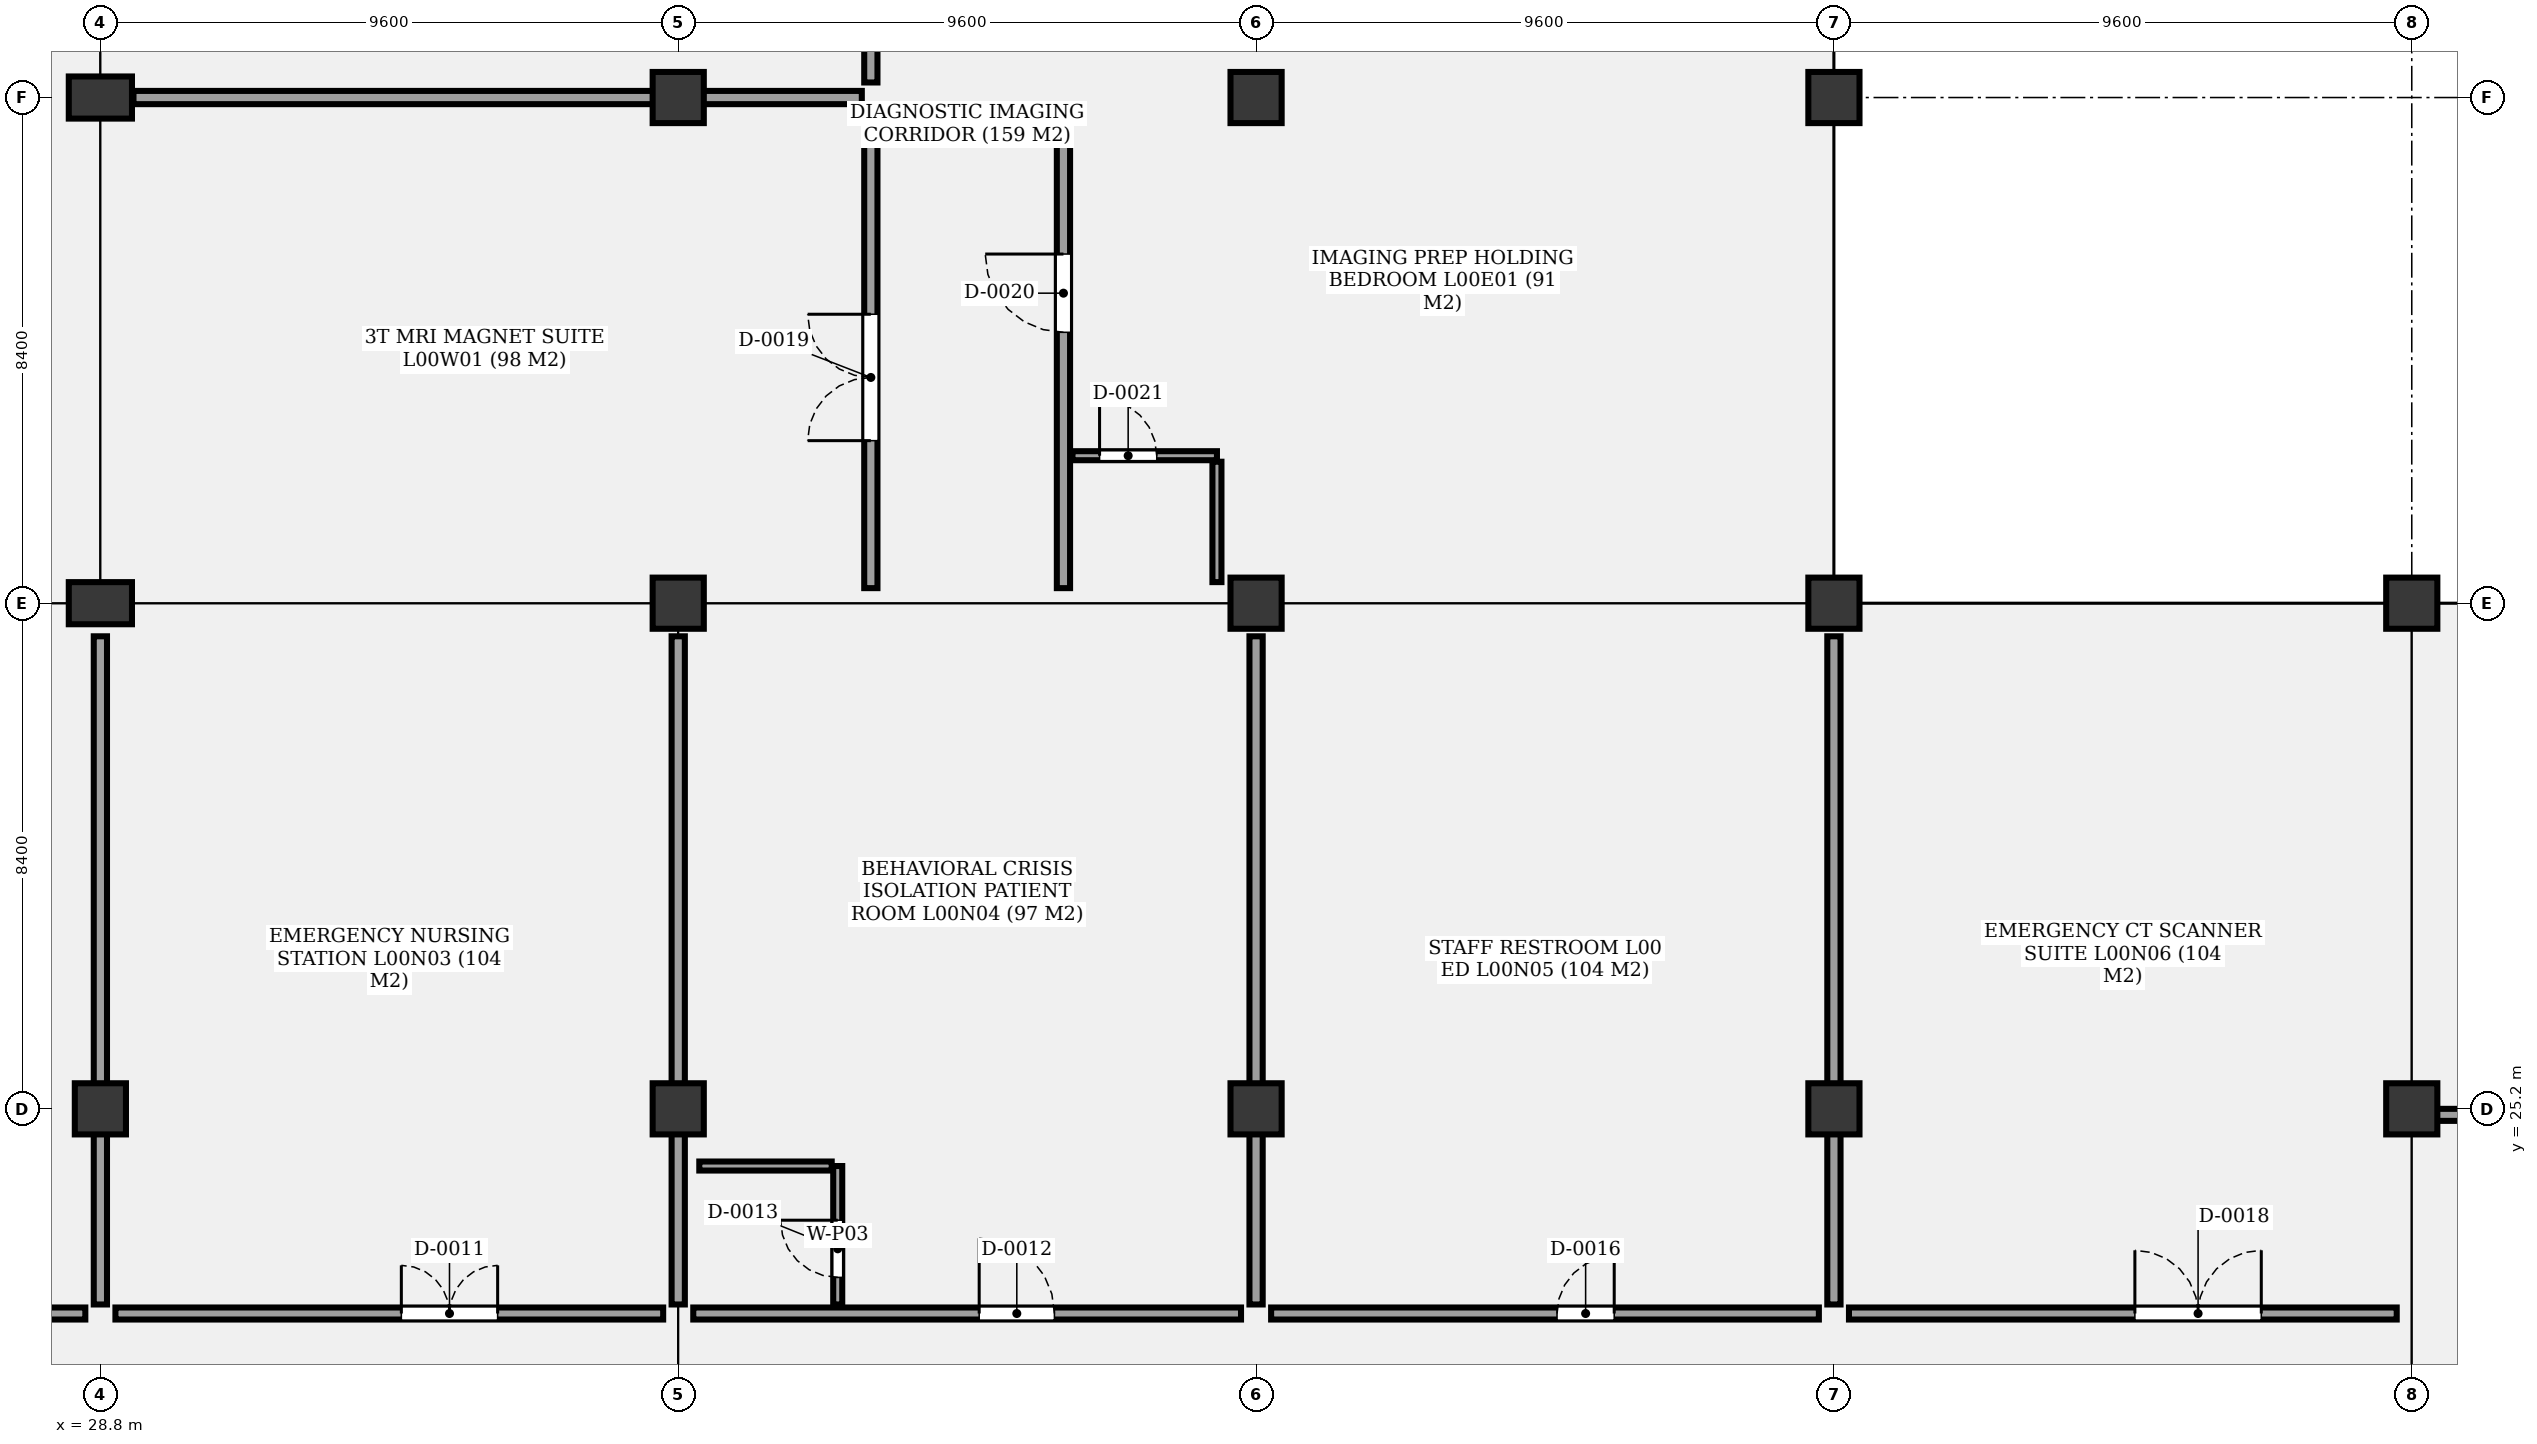
"""IFC4 building model, lengths in metres.
Left out: names, types, materials, properties, quantities, classifications, styles, units other than length and angle.
Written with IfcOpenShell. Run it as: python <this file> out.ifc"""

import sys

from ifc_helpers import new_model, si_unit, direction, frame, frame_2d, origin, origin_2d, place, context, subcontext, project, spatial, rectangle, extrude, element, fill, save


model = new_model("IFC4")
c1 = context("Model", 3, precision=1e-05, world=origin(), true_north=direction((0.0, 1.0)))
c2 = subcontext(c1, "Body", "Model", "MODEL_VIEW")
j1 = project(units=[si_unit("LENGTHUNIT", "METRE"), si_unit("PLANEANGLEUNIT", "RADIAN")], contexts=[c1])
p1 = place(None, origin())
s1 = spatial("IfcSite", under=j1, at=p1, CompositionType="ELEMENT")
p2 = place(p1, origin())
s2 = spatial("IfcBuilding", under=s1, at=p2, CompositionType="ELEMENT")
p3 = place(p2, origin())
s3 = spatial("IfcBuildingStorey", under=s2, at=p3, CompositionType="ELEMENT", Elevation=0.0)
p4 = place(p3, frame((28.8, 25.2, -0.35), z_axis=(0.0, 0.0, 1.0), x_axis=(1.0, 0.0, 0.0)))
e1 = element("IfcColumn", 1, at=p4, inside=s3, PredefinedType="COLUMN", context=c2, shape_type="SweptSolid", body=[
    extrude(rectangle(XDim=0.85, YDim=0.85, at=origin_2d()), origin(), (0.0, 0.0, 1.0), 5.45),
])
for number, where, z_axis, x_axis in (
    (2, (28.8, 33.6, -0.35), (0.0, 0.0, 1.0), (1.0, 0.0, 0.0)),
    (3, (28.8, 42.0, -0.35), (0.0, 0.0, 1.0), (1.0, 0.0, 0.0)),
):
    element("IfcColumn", number, at=place(p3, frame(where, z_axis=z_axis, x_axis=x_axis)), inside=s3, PredefinedType="COLUMN", context=c2, shape_type="SweptSolid", body=[
        extrude(rectangle(XDim=1.05, YDim=0.7, at=origin_2d()), origin(), (0.0, 0.0, 1.0), 5.45),
    ])
for number, where, z_axis, x_axis in (
    (4, (38.4, 25.2, -0.35), (0.0, 0.0, 1.0), (1.0, 0.0, 0.0)),
    (5, (38.4, 33.6, -0.35), (0.0, 0.0, 1.0), (1.0, 0.0, 0.0)),
    (6, (38.4, 42.0, -0.35), (0.0, 0.0, 1.0), (1.0, 0.0, 0.0)),
    (7, (48.0, 25.2, -0.35), (0.0, 0.0, 1.0), (1.0, 0.0, 0.0)),
    (8, (48.0, 33.6, -0.35), (0.0, 0.0, 1.0), (1.0, 0.0, 0.0)),
    (9, (48.0, 42.0, -0.35), (0.0, 0.0, 1.0), (1.0, 0.0, 0.0)),
    (10, (57.6, 25.2, -0.35), (0.0, 0.0, 1.0), (1.0, 0.0, 0.0)),
    (11, (57.6, 33.6, -0.35), (0.0, 0.0, 1.0), (1.0, 0.0, 0.0)),
    (12, (57.6, 42.0, -0.35), (0.0, 0.0, 1.0), (1.0, 0.0, 0.0)),
    (13, (67.2, 25.2, -0.35), (0.0, 0.0, 1.0), (1.0, 0.0, 0.0)),
    (14, (67.2, 33.6, -0.35), (0.0, 0.0, 1.0), (1.0, 0.0, 0.0)),
):
    element("IfcColumn", number, at=place(p3, frame(where, z_axis=z_axis, x_axis=x_axis)), inside=s3, PredefinedType="COLUMN", context=c2, shape_type="SweptSolid", body=[
        extrude(rectangle(XDim=0.85, YDim=0.85, at=origin_2d()), origin(), (0.0, 0.0, 1.0), 5.45),
    ])
p5 = place(p3, frame((67.6, 25.1, 0.0), z_axis=(0.0, 0.0, 1.0), x_axis=(1.0, 0.0, 0.0)))
e15 = element("IfcWall", 15, at=p5, inside=s3, PredefinedType="PARTITIONING", context=c2, shape_type="SweptSolid", body=[
    extrude(rectangle(XDim=66.4, YDim=0.2, at=frame_2d((33.2, 0.0))), origin(), (0.0, 0.0, 1.0), 3.98),
])
p6 = place(p5, frame((12.8, 0.0, 0.0)))
e16 = element("IfcOpeningElement", 16, at=p6, cuts=e15, PredefinedType="OPENING", context=c2, shape_type="SweptSolid", body=[
    extrude(rectangle(XDim=2.4, YDim=2.4, at=frame_2d((1.2, 1.2))), frame((0.0, 0.11, 0.0), z_axis=(0.0, -1.0, 0.0), x_axis=(1.0, 0.0, 0.0)), (0.0, 0.0, 1.0), 0.22),
])
p7 = place(p5, frame((32.65, 0.0, 0.0)))
e17 = element("IfcOpeningElement", 17, at=p7, cuts=e15, PredefinedType="OPENING", context=c2, shape_type="SweptSolid", body=[
    extrude(rectangle(XDim=1.1, YDim=2.1, at=frame_2d((0.55, 1.05))), frame((0.0, 0.11, 0.0), z_axis=(0.0, -1.0, 0.0), x_axis=(1.0, 0.0, 0.0)), (0.0, 0.0, 1.0), 0.22),
])
p8 = place(p5, frame((42.25, 0.0, 0.0)))
e18 = element("IfcOpeningElement", 18, at=p8, cuts=e15, PredefinedType="OPENING", context=c2, shape_type="SweptSolid", body=[
    extrude(rectangle(XDim=1.1, YDim=2.1, at=frame_2d((0.55, 1.05))), frame((0.0, 0.11, 0.0), z_axis=(0.0, -1.0, 0.0), x_axis=(1.0, 0.0, 0.0)), (0.0, 0.0, 1.0), 0.22),
])
p9 = place(p5, frame((51.5, 0.0, 0.0)))
e19 = element("IfcOpeningElement", 19, at=p9, cuts=e15, PredefinedType="OPENING", context=c2, shape_type="SweptSolid", body=[
    extrude(rectangle(XDim=1.8, YDim=2.2, at=frame_2d((0.9, 1.1))), frame((0.0, 0.11, 0.0), z_axis=(0.0, -1.0, 0.0), x_axis=(1.0, 0.0, 0.0)), (0.0, 0.0, 1.0), 0.22),
])
p10 = place(p3, frame((19.45, 21.8, 0.0), z_axis=(0.0, 0.0, 1.0), x_axis=(1.0, 0.0, 0.0)))
e20 = element("IfcWall", 20, at=p10, inside=s3, PredefinedType="PARTITIONING", context=c2, shape_type="SweptSolid", body=[
    extrude(rectangle(XDim=9.1, YDim=0.2, at=frame_2d((4.55, 0.0))), origin(), (0.0, 0.0, 1.0), 3.98),
])
p11 = place(p10, frame((4.75, 0.0, 0.0)))
e21 = element("IfcOpeningElement", 21, at=p11, cuts=e20, PredefinedType="OPENING", context=c2, shape_type="SweptSolid", body=[
    extrude(rectangle(XDim=2.0, YDim=2.4, at=frame_2d((1.0, 1.2))), frame((0.0, 0.11, 0.0), z_axis=(0.0, -1.0, 0.0), x_axis=(1.0, 0.0, 0.0)), (0.0, 0.0, 1.0), 0.22),
])
p12 = place(p3, frame((29.05, 21.8, 0.0), z_axis=(0.0, 0.0, 1.0), x_axis=(1.0, 0.0, 0.0)))
e22 = element("IfcWall", 22, at=p12, inside=s3, PredefinedType="PARTITIONING", context=c2, shape_type="SweptSolid", body=[
    extrude(rectangle(XDim=9.1, YDim=0.2, at=frame_2d((4.55, 0.0))), origin(), (0.0, 0.0, 1.0), 3.98),
])
p13 = place(p12, frame((4.75, 0.0, 0.0)))
e23 = element("IfcOpeningElement", 23, at=p13, cuts=e22, PredefinedType="OPENING", context=c2, shape_type="SweptSolid", body=[
    extrude(rectangle(XDim=1.6, YDim=2.2, at=frame_2d((0.8, 1.1))), frame((0.0, 0.11, 0.0), z_axis=(0.0, -1.0, 0.0), x_axis=(1.0, 0.0, 0.0)), (0.0, 0.0, 1.0), 0.22),
])
p14 = place(p3, frame((28.8, 21.95, 0.0), z_axis=(0.0, 0.0, 1.0), x_axis=(0.0, 1.0, 0.0)))
e24 = element("IfcWall", 24, at=p14, inside=s3, PredefinedType="PARTITIONING", context=c2, shape_type="SweptSolid", body=[
    extrude(rectangle(XDim=11.1, YDim=0.22, at=frame_2d((5.55, 0.0))), origin(), (0.0, 0.0, 1.0), 3.98),
])
p15 = place(p3, frame((38.65, 21.8, 0.0), z_axis=(0.0, 0.0, 1.0), x_axis=(1.0, 0.0, 0.0)))
e25 = element("IfcWall", 25, at=p15, inside=s3, PredefinedType="PARTITIONING", context=c2, shape_type="SweptSolid", body=[
    extrude(rectangle(XDim=9.1, YDim=0.2, at=frame_2d((4.55, 0.0))), origin(), (0.0, 0.0, 1.0), 3.98),
])
p16 = place(p15, frame((4.75, 0.0, 0.0)))
e26 = element("IfcOpeningElement", 26, at=p16, cuts=e25, PredefinedType="OPENING", context=c2, shape_type="SweptSolid", body=[
    extrude(rectangle(XDim=1.25, YDim=2.2, at=frame_2d((0.625, 1.1))), frame((0.0, 0.11, 0.0), z_axis=(0.0, -1.0, 0.0), x_axis=(1.0, 0.0, 0.0)), (0.0, 0.0, 1.0), 0.22),
])
p17 = place(p3, frame((41.05, 21.95, 0.0), z_axis=(0.0, 0.0, 1.0), x_axis=(0.0, 1.0, 0.0)))
e27 = element("IfcWall", 27, at=p17, inside=s3, PredefinedType="PARTITIONING", context=c2, shape_type="SweptSolid", body=[
    extrude(rectangle(XDim=2.3, YDim=0.15, at=frame_2d((1.15, 0.0))), origin(), (0.0, 0.0, 1.0), 3.98),
])
p18 = place(p17, frame((0.45, 0.0, 0.0)))
e28 = element("IfcOpeningElement", 28, at=p18, cuts=e27, PredefinedType="OPENING", context=c2, shape_type="SweptSolid", body=[
    extrude(rectangle(XDim=0.95, YDim=2.1, at=frame_2d((0.475, 1.05))), frame((0.0, 0.085, 0.0), z_axis=(0.0, -1.0, 0.0), x_axis=(1.0, 0.0, 0.0)), (0.0, 0.0, 1.0), 0.17),
])
p19 = place(p3, frame((38.75, 24.25, 0.0), z_axis=(0.0, 0.0, 1.0), x_axis=(1.0, 0.0, 0.0)))
e29 = element("IfcWall", 29, at=p19, inside=s3, PredefinedType="PARTITIONING", context=c2, shape_type="SweptSolid", body=[
    extrude(rectangle(XDim=2.2, YDim=0.15, at=frame_2d((1.1, 0.0))), origin(), (0.0, 0.0, 1.0), 3.98),
])
p20 = place(p3, frame((38.4, 21.95, 0.0), z_axis=(0.0, 0.0, 1.0), x_axis=(0.0, 1.0, 0.0)))
e30 = element("IfcWall", 30, at=p20, inside=s3, PredefinedType="PARTITIONING", context=c2, shape_type="SweptSolid", body=[
    extrude(rectangle(XDim=11.1, YDim=0.22, at=frame_2d((5.55, 0.0))), origin(), (0.0, 0.0, 1.0), 3.98),
])
p21 = place(p3, frame((48.25, 21.8, 0.0), z_axis=(0.0, 0.0, 1.0), x_axis=(1.0, 0.0, 0.0)))
e31 = element("IfcWall", 31, at=p21, inside=s3, PredefinedType="PARTITIONING", context=c2, shape_type="SweptSolid", body=[
    extrude(rectangle(XDim=9.1, YDim=0.2, at=frame_2d((4.55, 0.0))), origin(), (0.0, 0.0, 1.0), 3.98),
])
p22 = place(p21, frame((4.75, 0.0, 0.0)))
e32 = element("IfcOpeningElement", 32, at=p22, cuts=e31, PredefinedType="OPENING", context=c2, shape_type="SweptSolid", body=[
    extrude(rectangle(XDim=0.95, YDim=2.1, at=frame_2d((0.475, 1.05))), frame((0.0, 0.11, 0.0), z_axis=(0.0, -1.0, 0.0), x_axis=(1.0, 0.0, 0.0)), (0.0, 0.0, 1.0), 0.22),
])
p23 = place(p3, frame((48.0, 21.95, 0.0), z_axis=(0.0, 0.0, 1.0), x_axis=(0.0, 1.0, 0.0)))
e33 = element("IfcWall", 33, at=p23, inside=s3, PredefinedType="PARTITIONING", context=c2, shape_type="SweptSolid", body=[
    extrude(rectangle(XDim=11.1, YDim=0.22, at=frame_2d((5.55, 0.0))), origin(), (0.0, 0.0, 1.0), 3.98),
])
p24 = place(p3, frame((57.85, 21.8, 0.0), z_axis=(0.0, 0.0, 1.0), x_axis=(1.0, 0.0, 0.0)))
e34 = element("IfcWall", 34, at=p24, inside=s3, PredefinedType="PARTITIONING", context=c2, shape_type="SweptSolid", body=[
    extrude(rectangle(XDim=9.1, YDim=0.2, at=frame_2d((4.55, 0.0))), origin(), (0.0, 0.0, 1.0), 3.98),
])
p25 = place(p24, frame((4.75, 0.0, 0.0)))
e35 = element("IfcOpeningElement", 35, at=p25, cuts=e34, PredefinedType="OPENING", context=c2, shape_type="SweptSolid", body=[
    extrude(rectangle(XDim=2.1, YDim=2.4, at=frame_2d((1.05, 1.2))), frame((0.0, 0.11, 0.0), z_axis=(0.0, -1.0, 0.0), x_axis=(1.0, 0.0, 0.0)), (0.0, 0.0, 1.0), 0.22),
])
p26 = place(p3, frame((57.6, 21.95, 0.0), z_axis=(0.0, 0.0, 1.0), x_axis=(0.0, 1.0, 0.0)))
e36 = element("IfcWall", 36, at=p26, inside=s3, PredefinedType="PARTITIONING", context=c2, shape_type="SweptSolid", body=[
    extrude(rectangle(XDim=11.1, YDim=0.22, at=frame_2d((5.55, 0.0))), origin(), (0.0, 0.0, 1.0), 3.98),
])
p27 = place(p3, frame((41.6, 33.85, 0.0), z_axis=(0.0, 0.0, 1.0), x_axis=(0.0, 1.0, 0.0)))
e37 = element("IfcWall", 37, at=p27, inside=s3, PredefinedType="PARTITIONING", context=c2, shape_type="SweptSolid", body=[
    extrude(rectangle(XDim=7.9, YDim=0.22, at=frame_2d((3.95, 0.0))), origin(), (0.0, 0.0, 1.0), 3.98),
])
p28 = place(p27, frame((2.45, 0.0, 0.0)))
e38 = element("IfcOpeningElement", 38, at=p28, cuts=e37, PredefinedType="OPENING", context=c2, shape_type="SweptSolid", body=[
    extrude(rectangle(XDim=2.1, YDim=2.4, at=frame_2d((1.05, 1.2))), frame((0.0, 0.12, 0.0), z_axis=(0.0, -1.0, 0.0), x_axis=(1.0, 0.0, 0.0)), (0.0, 0.0, 1.0), 0.24),
])
p29 = place(p3, frame((44.8, 33.85, 0.0), z_axis=(0.0, 0.0, 1.0), x_axis=(0.0, 1.0, 0.0)))
e39 = element("IfcWall", 39, at=p29, inside=s3, PredefinedType="PARTITIONING", context=c2, shape_type="SweptSolid", body=[
    extrude(rectangle(XDim=7.9, YDim=0.22, at=frame_2d((3.95, 0.0))), origin(), (0.0, 0.0, 1.0), 3.98),
])
p30 = place(p29, frame((4.25, 0.0, 0.0)))
e40 = element("IfcOpeningElement", 40, at=p30, cuts=e39, PredefinedType="OPENING", context=c2, shape_type="SweptSolid", body=[
    extrude(rectangle(XDim=1.3, YDim=2.2, at=frame_2d((0.65, 1.1))), frame((0.0, 0.12, 0.0), z_axis=(0.0, -1.0, 0.0), x_axis=(1.0, 0.0, 0.0)), (0.0, 0.0, 1.0), 0.24),
])
p31 = place(p3, frame((44.95, 36.05, 0.0), z_axis=(0.0, 0.0, 1.0), x_axis=(1.0, 0.0, 0.0)))
e41 = element("IfcWall", 41, at=p31, inside=s3, PredefinedType="PARTITIONING", context=c2, shape_type="SweptSolid", body=[
    extrude(rectangle(XDim=2.4, YDim=0.15, at=frame_2d((1.2, 0.0))), origin(), (0.0, 0.0, 1.0), 3.98),
])
p32 = place(p31, frame((0.45, 0.0, 0.0)))
e42 = element("IfcOpeningElement", 42, at=p32, cuts=e41, PredefinedType="OPENING", context=c2, shape_type="SweptSolid", body=[
    extrude(rectangle(XDim=0.95, YDim=2.1, at=frame_2d((0.475, 1.05))), frame((0.0, 0.085, 0.0), z_axis=(0.0, -1.0, 0.0), x_axis=(1.0, 0.0, 0.0)), (0.0, 0.0, 1.0), 0.17),
])
p33 = place(p3, frame((47.35, 33.95, 0.0), z_axis=(0.0, 0.0, 1.0), x_axis=(0.0, 1.0, 0.0)))
e43 = element("IfcWall", 43, at=p33, inside=s3, PredefinedType="PARTITIONING", context=c2, shape_type="SweptSolid", body=[
    extrude(rectangle(XDim=2.0, YDim=0.15, at=frame_2d((1.0, 0.0))), origin(), (0.0, 0.0, 1.0), 3.98),
])
p34 = place(p3, frame((41.6, 42.25, 0.0), z_axis=(0.0, 0.0, 1.0), x_axis=(0.0, 1.0, 0.0)))
e44 = element("IfcWall", 44, at=p34, inside=s3, PredefinedType="PARTITIONING", context=c2, shape_type="SweptSolid", body=[
    extrude(rectangle(XDim=7.9, YDim=0.22, at=frame_2d((3.95, 0.0))), origin(), (0.0, 0.0, 1.0), 3.98),
])
p35 = place(p34, frame((2.45, 0.0, 0.0)))
e45 = element("IfcOpeningElement", 45, at=p35, cuts=e44, PredefinedType="OPENING", context=c2, shape_type="SweptSolid", body=[
    extrude(rectangle(XDim=2.1, YDim=2.4, at=frame_2d((1.05, 1.2))), frame((0.0, 0.12, 0.0), z_axis=(0.0, -1.0, 0.0), x_axis=(1.0, 0.0, 0.0)), (0.0, 0.0, 1.0), 0.24),
])
p36 = place(p3, frame((29.35, 42.0, 0.0), z_axis=(0.0, 0.0, 1.0), x_axis=(1.0, 0.0, 0.0)))
e46 = element("IfcWall", 46, at=p36, inside=s3, PredefinedType="PARTITIONING", context=c2, shape_type="SweptSolid", body=[
    extrude(rectangle(XDim=12.1, YDim=0.22, at=frame_2d((6.05, 0.0))), origin(), (0.0, 0.0, 1.0), 3.98),
])
p37 = place(p13, origin())
e47 = element("IfcDoor", 47, at=p37, inside=s3, OperationType="DOUBLE_DOOR_SINGLE_SWING", PredefinedType="DOOR", context=c2, shape_type="SweptSolid", body=[
    extrude(rectangle(XDim=1.6, YDim=2.2, at=frame_2d((0.8, 1.1))), frame((0.0, 0.025, 0.0), z_axis=(0.0, -1.0, 0.0), x_axis=(1.0, 0.0, 0.0)), (0.0, 0.0, 1.0), 0.05),
])
fill(e23, e47)
p38 = place(p16, origin())
e48 = element("IfcDoor", 48, at=p38, inside=s3, OperationType="SINGLE_SWING_LEFT", PredefinedType="DOOR", context=c2, shape_type="SweptSolid", body=[
    extrude(rectangle(XDim=1.25, YDim=2.2, at=frame_2d((0.625, 1.1))), frame((0.0, 0.025, 0.0), z_axis=(0.0, -1.0, 0.0), x_axis=(1.0, 0.0, 0.0)), (0.0, 0.0, 1.0), 0.05),
])
fill(e26, e48)
p39 = place(p18, origin())
e49 = element("IfcDoor", 49, at=p39, inside=s3, OperationType="SINGLE_SWING_RIGHT", PredefinedType="DOOR", context=c2, shape_type="SweptSolid", body=[
    extrude(rectangle(XDim=0.95, YDim=2.1, at=frame_2d((0.475, 1.05))), frame((0.0, 0.025, 0.0), z_axis=(0.0, -1.0, 0.0), x_axis=(1.0, 0.0, 0.0)), (0.0, 0.0, 1.0), 0.05),
])
fill(e28, e49)
p40 = place(p22, origin())
e50 = element("IfcDoor", 50, at=p40, inside=s3, OperationType="SINGLE_SWING_RIGHT", PredefinedType="DOOR", context=c2, shape_type="SweptSolid", body=[
    extrude(rectangle(XDim=0.95, YDim=2.1, at=frame_2d((0.475, 1.05))), frame((0.0, 0.025, 0.0), z_axis=(0.0, -1.0, 0.0), x_axis=(1.0, 0.0, 0.0)), (0.0, 0.0, 1.0), 0.05),
])
fill(e32, e50)
p41 = place(p25, origin())
e51 = element("IfcDoor", 51, at=p41, inside=s3, OperationType="DOUBLE_DOOR_SINGLE_SWING", PredefinedType="DOOR", context=c2, shape_type="SweptSolid", body=[
    extrude(rectangle(XDim=2.1, YDim=2.4, at=frame_2d((1.05, 1.2))), frame((0.0, 0.025, 0.0), z_axis=(0.0, -1.0, 0.0), x_axis=(1.0, 0.0, 0.0)), (0.0, 0.0, 1.0), 0.05),
])
fill(e35, e51)
p42 = place(p28, origin())
e52 = element("IfcDoor", 52, at=p42, inside=s3, OperationType="DOUBLE_DOOR_SINGLE_SWING", PredefinedType="DOOR", context=c2, shape_type="SweptSolid", body=[
    extrude(rectangle(XDim=2.1, YDim=2.4, at=frame_2d((1.05, 1.2))), frame((0.0, 0.025, 0.0), z_axis=(0.0, -1.0, 0.0), x_axis=(1.0, 0.0, 0.0)), (0.0, 0.0, 1.0), 0.05),
])
fill(e38, e52)
p43 = place(p30, origin())
e53 = element("IfcDoor", 53, at=p43, inside=s3, OperationType="SINGLE_SWING_RIGHT", PredefinedType="DOOR", context=c2, shape_type="SweptSolid", body=[
    extrude(rectangle(XDim=1.3, YDim=2.2, at=frame_2d((0.65, 1.1))), frame((0.0, 0.025, 0.0), z_axis=(0.0, -1.0, 0.0), x_axis=(1.0, 0.0, 0.0)), (0.0, 0.0, 1.0), 0.05),
])
fill(e40, e53)
p44 = place(p32, origin())
e54 = element("IfcDoor", 54, at=p44, inside=s3, OperationType="SINGLE_SWING_LEFT", PredefinedType="DOOR", context=c2, shape_type="SweptSolid", body=[
    extrude(rectangle(XDim=0.95, YDim=2.1, at=frame_2d((0.475, 1.05))), frame((0.0, 0.025, 0.0), z_axis=(0.0, -1.0, 0.0), x_axis=(1.0, 0.0, 0.0)), (0.0, 0.0, 1.0), 0.05),
])
fill(e42, e54)
save(model, sys.argv[1])
